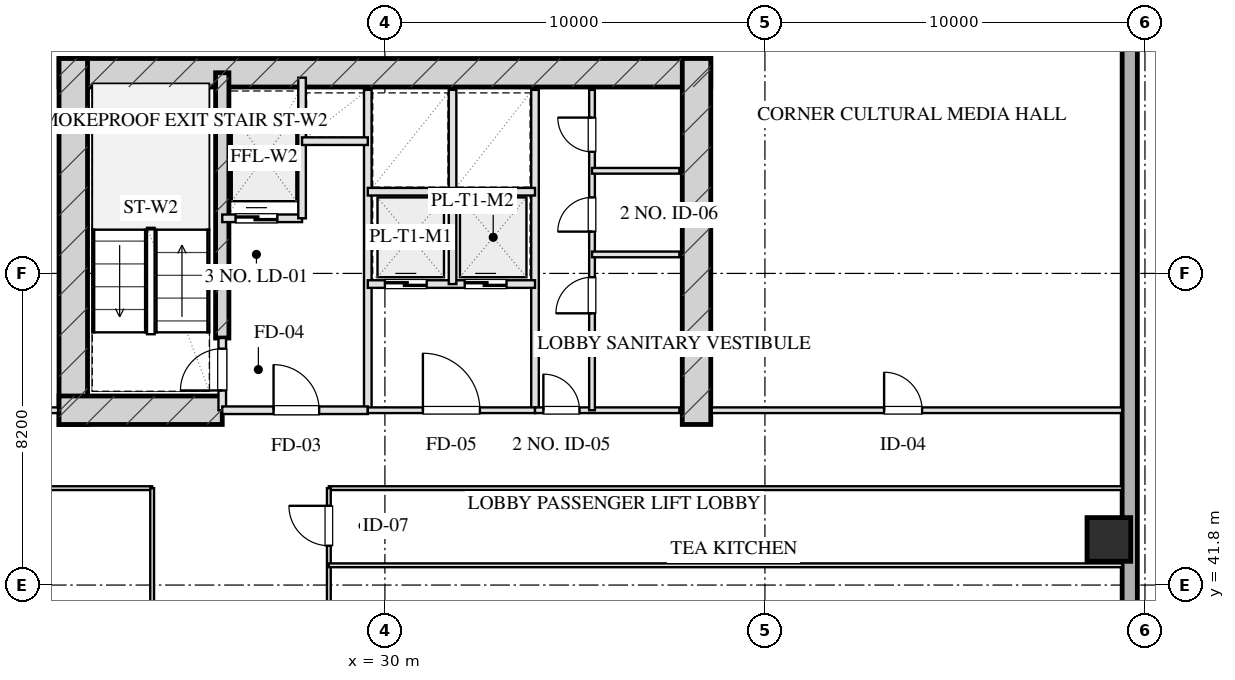
"""IFC4 building model, lengths in metres.
Left out: names, types, materials, properties, quantities, classifications, styles, units other than length and angle.
Written with IfcOpenShell. Run it as: python <this file> out.ifc"""

import sys

from ifc_helpers import new_model, si_unit, direction, frame, frame_2d, origin, origin_2d, place, context, subcontext, project, spatial, rectangle, hollow_rectangle, extrude, element, fill, save


model = new_model("IFC4")
c1 = context("Model", 3, precision=1e-05, world=origin(), true_north=direction((0.0, 1.0)))
c2 = subcontext(c1, "Body", "Model", "MODEL_VIEW")
j1 = project(units=[si_unit("LENGTHUNIT", "METRE"), si_unit("PLANEANGLEUNIT", "RADIAN")], contexts=[c1])
p1 = place(None, origin())
s1 = spatial("IfcSite", under=j1, at=p1, CompositionType="ELEMENT")
p2 = place(p1, origin())
s2 = spatial("IfcBuilding", under=s1, at=p2, CompositionType="ELEMENT")
p3 = place(p2, frame((0.0, 0.0, 74.75)))
s3 = spatial("IfcBuildingStorey", under=s2, at=p3, CompositionType="ELEMENT", Elevation=74.75)
p4 = place(p3, frame((21.425, 55.28, 0.0), z_axis=(0.0, 0.0, 1.0), x_axis=(1.0, 0.0, 0.0)))
e1 = element("IfcWall", 1, at=p4, inside=s3, PredefinedType="SHEAR", context=c2, shape_type="SweptSolid", body=[
    extrude(rectangle(XDim=17.15, YDim=0.75, at=frame_2d((8.575, 0.0))), origin(), (0.0, 0.0, 1.0), 3.45),
])
for number, where, z_axis, x_axis in (
    (2, (21.8, 46.025, 0.0), (0.0, 0.0, 1.0), (0.0, 1.0, 0.0)),
    (3, (38.2, 46.025, 0.0), (0.0, 0.0, 1.0), (0.0, 1.0, 0.0)),
):
    element("IfcWall", number, at=place(p3, frame(where, z_axis=z_axis, x_axis=x_axis)), inside=s3, PredefinedType="SHEAR", context=c2, shape_type="SweptSolid", body=[
        extrude(rectangle(XDim=9.63, YDim=0.75, at=frame_2d((4.815, 0.0))), origin(), (0.0, 0.0, 1.0), 3.45),
    ])
p5 = place(p3, frame((25.72, 48.3, 0.0), z_axis=(0.0, 0.0, 1.0), x_axis=(0.0, 1.0, 0.0)))
e4 = element("IfcWall", 4, at=p5, inside=s3, PredefinedType="SHEAR", context=c2, shape_type="SweptSolid", body=[
    extrude(rectangle(XDim=6.98, YDim=0.35, at=frame_2d((3.49, 0.0))), origin(), (0.0, 0.0, 1.0), 3.45),
])
p6 = place(p3, frame((21.425, 46.4, 0.0), z_axis=(0.0, 0.0, 1.0), x_axis=(1.0, 0.0, 0.0)))
e5 = element("IfcWall", 5, at=p6, inside=s3, PredefinedType="SHEAR", context=c2, shape_type="SweptSolid", body=[
    extrude(rectangle(XDim=4.295, YDim=0.75, at=frame_2d((2.147, 0.0))), origin(), (0.0, 0.0, 1.0), 3.45),
])
p7 = place(p3, frame((49.05, 43.0, 0.0), z_axis=(0.0, 0.0, 1.0), x_axis=(1.0, 0.0, 0.0)))
e6 = element("IfcColumn", 6, at=p7, inside=s3, PredefinedType="COLUMN", context=c2, shape_type="SweptSolid", body=[
    extrude(hollow_rectangle(XDim=1.15, YDim=1.15, WallThickness=0.04, at=origin_2d()), origin(), (0.0, 0.0, 1.0), 3.451),
])
p8 = place(p3, frame((49.6, 60.8, 0.0), z_axis=(0.0, 0.0, 1.0), x_axis=(0.0, -1.0, 0.0)))
e7 = element("IfcWall", 7, at=p8, inside=s3, PredefinedType="SOLIDWALL", context=c2, shape_type="SweptSolid", body=[
    extrude(rectangle(XDim=53.6, YDim=0.4, at=frame_2d((26.8, 0.0))), origin(), (0.0, 0.0, 1.0), 2.61),
])
p9 = place(p3, frame((25.72, 46.4, 0.0), z_axis=(0.0, 0.0, 1.0), x_axis=(0.0, 1.0, 0.0)))
e8 = element("IfcWall", 8, at=p9, inside=s3, PredefinedType="PARTITIONING", context=c2, shape_type="SweptSolid", body=[
    extrude(rectangle(XDim=1.9, YDim=0.2, at=frame_2d((0.95, 0.0))), origin(), (0.0, 0.0, 1.0), 3.175),
])
p10 = place(p9, frame((0.52, 0.0, 0.0)))
e9 = element("IfcOpeningElement", 9, at=p10, cuts=e8, PredefinedType="OPENING", context=c2, shape_type="SweptSolid", body=[
    extrude(rectangle(XDim=1.1, YDim=2.05, at=frame_2d((0.55, 1.025))), frame((0.0, 0.11, 0.0), z_axis=(0.0, -1.0, 0.0), x_axis=(1.0, 0.0, 0.0)), (0.0, 0.0, 1.0), 0.22),
])
p11 = place(p3, frame((29.55, 46.4, 0.0), z_axis=(0.0, 0.0, 1.0), x_axis=(0.0, 1.0, 0.0)))
e10 = element("IfcWall", 10, at=p11, inside=s3, PredefinedType="PARTITIONING", context=c2, shape_type="SweptSolid", body=[
    extrude(rectangle(XDim=8.43, YDim=0.2, at=frame_2d((4.215, 0.0))), origin(), (0.0, 0.0, 1.0), 3.175),
])
p12 = place(p3, frame((25.72, 46.4, 0.0), z_axis=(0.0, 0.0, 1.0), x_axis=(1.0, 0.0, 0.0)))
e11 = element("IfcWall", 11, at=p12, inside=s3, PredefinedType="PARTITIONING", context=c2, shape_type="SweptSolid", body=[
    extrude(rectangle(XDim=3.83, YDim=0.2, at=frame_2d((1.915, 0.0))), origin(), (0.0, 0.0, 1.0), 3.175),
])
p13 = place(p12, frame((1.35, 0.0, 0.0)))
e12 = element("IfcOpeningElement", 12, at=p13, cuts=e11, PredefinedType="OPENING", context=c2, shape_type="SweptSolid", body=[
    extrude(rectangle(XDim=1.2, YDim=2.05, at=frame_2d((0.6, 1.025))), frame((0.0, 0.11, 0.0), z_axis=(0.0, -1.0, 0.0), x_axis=(1.0, 0.0, 0.0)), (0.0, 0.0, 1.0), 0.22),
])
p14 = place(p3, frame((25.72, 51.45, 0.0), z_axis=(0.0, 0.0, 1.0), x_axis=(1.0, 0.0, 0.0)))
e13 = element("IfcWall", 13, at=p14, inside=s3, PredefinedType="PARTITIONING", context=c2, shape_type="SweptSolid", body=[
    extrude(rectangle(XDim=2.1, YDim=0.2, at=frame_2d((1.05, 0.0))), origin(), (0.0, 0.0, 1.0), 3.175),
])
p15 = place(p14, frame((0.35, 0.0, 0.0)))
e14 = element("IfcOpeningElement", 14, at=p15, cuts=e13, PredefinedType="OPENING", context=c2, shape_type="SweptSolid", body=[
    extrude(rectangle(XDim=1.1, YDim=2.05, at=frame_2d((0.55, 1.025))), frame((0.0, 0.11, 0.0), z_axis=(0.0, -1.0, 0.0), x_axis=(1.0, 0.0, 0.0)), (0.0, 0.0, 1.0), 0.22),
])
p16 = place(p3, frame((27.82, 51.45, 0.0), z_axis=(0.0, 0.0, 1.0), x_axis=(0.0, 1.0, 0.0)))
e15 = element("IfcWall", 15, at=p16, inside=s3, PredefinedType="PARTITIONING", context=c2, shape_type="SweptSolid", body=[
    extrude(rectangle(XDim=3.7, YDim=0.2, at=frame_2d((1.85, 0.0))), origin(), (0.0, 0.0, 1.0), 3.175),
])
p17 = place(p3, frame((27.82, 53.48, 0.0), z_axis=(0.0, 0.0, 1.0), x_axis=(1.0, 0.0, 0.0)))
e16 = element("IfcWall", 16, at=p17, inside=s3, PredefinedType="PARTITIONING", context=c2, shape_type="SweptSolid", body=[
    extrude(rectangle(XDim=1.73, YDim=0.2, at=frame_2d((0.865, 0.0))), origin(), (0.0, 0.0, 1.0), 3.175),
])
p18 = place(p3, frame((33.95, 46.4, 0.0), z_axis=(0.0, 0.0, 1.0), x_axis=(0.0, 1.0, 0.0)))
e17 = element("IfcWall", 17, at=p18, inside=s3, PredefinedType="PARTITIONING", context=c2, shape_type="SweptSolid", body=[
    extrude(rectangle(XDim=8.43, YDim=0.2, at=frame_2d((4.215, 0.0))), origin(), (0.0, 0.0, 1.0), 3.175),
])
p19 = place(p3, frame((29.55, 46.4, 0.0), z_axis=(0.0, 0.0, 1.0), x_axis=(1.0, 0.0, 0.0)))
e18 = element("IfcWall", 18, at=p19, inside=s3, PredefinedType="PARTITIONING", context=c2, shape_type="SweptSolid", body=[
    extrude(rectangle(XDim=4.4, YDim=0.15, at=frame_2d((2.2, 0.0))), origin(), (0.0, 0.0, 1.0), 3.175),
])
p20 = place(p19, frame((1.45, 0.0, 0.0)))
e19 = element("IfcOpeningElement", 19, at=p20, cuts=e18, PredefinedType="OPENING", context=c2, shape_type="SweptSolid", body=[
    extrude(rectangle(XDim=1.5, YDim=2.05, at=frame_2d((0.75, 1.025))), frame((0.0, 0.085, 0.0), z_axis=(0.0, -1.0, 0.0), x_axis=(1.0, 0.0, 0.0)), (0.0, 0.0, 1.0), 0.17),
])
p21 = place(p3, frame((29.55, 49.72, 0.0), z_axis=(0.0, 0.0, 1.0), x_axis=(1.0, 0.0, 0.0)))
e20 = element("IfcWall", 20, at=p21, inside=s3, PredefinedType="PARTITIONING", context=c2, shape_type="SweptSolid", body=[
    extrude(rectangle(XDim=4.4, YDim=0.2, at=frame_2d((2.2, 0.0))), origin(), (0.0, 0.0, 1.0), 3.175),
])
p22 = place(p21, frame((0.45, 0.0, 0.0)))
e21 = element("IfcOpeningElement", 21, at=p22, cuts=e20, PredefinedType="OPENING", context=c2, shape_type="SweptSolid", body=[
    extrude(rectangle(XDim=1.1, YDim=2.05, at=frame_2d((0.55, 1.025))), frame((0.0, 0.11, 0.0), z_axis=(0.0, -1.0, 0.0), x_axis=(1.0, 0.0, 0.0)), (0.0, 0.0, 1.0), 0.22),
])
p23 = place(p21, frame((2.55, 0.0, 0.0)))
e22 = element("IfcOpeningElement", 22, at=p23, cuts=e20, PredefinedType="OPENING", context=c2, shape_type="SweptSolid", body=[
    extrude(rectangle(XDim=1.1, YDim=2.05, at=frame_2d((0.55, 1.025))), frame((0.0, 0.11, 0.0), z_axis=(0.0, -1.0, 0.0), x_axis=(1.0, 0.0, 0.0)), (0.0, 0.0, 1.0), 0.22),
])
p24 = place(p3, frame((31.78, 49.72, 0.0), z_axis=(0.0, 0.0, 1.0), x_axis=(0.0, 1.0, 0.0)))
e23 = element("IfcWall", 23, at=p24, inside=s3, PredefinedType="PARTITIONING", context=c2, shape_type="SweptSolid", body=[
    extrude(rectangle(XDim=5.11, YDim=0.2, at=frame_2d((2.555, 0.0))), origin(), (0.0, 0.0, 1.0), 3.175),
])
p25 = place(p3, frame((29.55, 52.15, 0.0), z_axis=(0.0, 0.0, 1.0), x_axis=(1.0, 0.0, 0.0)))
e24 = element("IfcWall", 24, at=p25, inside=s3, PredefinedType="PARTITIONING", context=c2, shape_type="SweptSolid", body=[
    extrude(rectangle(XDim=4.4, YDim=0.2, at=frame_2d((2.2, 0.0))), origin(), (0.0, 0.0, 1.0), 3.175),
])
p26 = place(p3, frame((33.95, 46.4, 0.0), z_axis=(0.0, 0.0, 1.0), x_axis=(1.0, 0.0, 0.0)))
e25 = element("IfcWall", 25, at=p26, inside=s3, PredefinedType="PARTITIONING", context=c2, shape_type="SweptSolid", body=[
    extrude(rectangle(XDim=3.8, YDim=0.15, at=frame_2d((1.9, 0.0))), origin(), (0.0, 0.0, 1.0), 3.175),
])
p27 = place(p26, frame((0.22, 0.0, 0.0)))
e26 = element("IfcOpeningElement", 26, at=p27, cuts=e25, PredefinedType="OPENING", context=c2, shape_type="SweptSolid", body=[
    extrude(rectangle(XDim=0.95, YDim=2.05, at=frame_2d((0.475, 1.025))), frame((0.0, 0.085, 0.0), z_axis=(0.0, -1.0, 0.0), x_axis=(1.0, 0.0, 0.0)), (0.0, 0.0, 1.0), 0.17),
])
p28 = place(p3, frame((35.45, 46.4, 0.0), z_axis=(0.0, 0.0, 1.0), x_axis=(0.0, 1.0, 0.0)))
e27 = element("IfcWall", 27, at=p28, inside=s3, PredefinedType="PARTITIONING", context=c2, shape_type="SweptSolid", body=[
    extrude(rectangle(XDim=8.43, YDim=0.15, at=frame_2d((4.215, 0.0))), origin(), (0.0, 0.0, 1.0), 2.765),
])
p29 = place(p28, frame((2.55, 0.0, 0.0)))
e28 = element("IfcOpeningElement", 28, at=p29, cuts=e27, PredefinedType="OPENING", context=c2, shape_type="SweptSolid", body=[
    extrude(rectangle(XDim=0.95, YDim=2.05, at=frame_2d((0.475, 1.025))), frame((0.0, 0.085, 0.0), z_axis=(0.0, -1.0, 0.0), x_axis=(1.0, 0.0, 0.0)), (0.0, 0.0, 1.0), 0.17),
])
p30 = place(p28, frame((4.7, 0.0, 0.0)))
e29 = element("IfcOpeningElement", 29, at=p30, cuts=e27, PredefinedType="OPENING", context=c2, shape_type="SweptSolid", body=[
    extrude(rectangle(XDim=0.9, YDim=2.05, at=frame_2d((0.45, 1.025))), frame((0.0, 0.085, 0.0), z_axis=(0.0, -1.0, 0.0), x_axis=(1.0, 0.0, 0.0)), (0.0, 0.0, 1.0), 0.17),
])
p31 = place(p28, frame((6.8, 0.0, 0.0)))
e30 = element("IfcOpeningElement", 30, at=p31, cuts=e27, PredefinedType="OPENING", context=c2, shape_type="SweptSolid", body=[
    extrude(rectangle(XDim=0.9, YDim=2.05, at=frame_2d((0.45, 1.025))), frame((0.0, 0.085, 0.0), z_axis=(0.0, -1.0, 0.0), x_axis=(1.0, 0.0, 0.0)), (0.0, 0.0, 1.0), 0.17),
])
for number, where, z_axis, x_axis in (
    (31, (35.45, 50.5, 0.0), (0.0, 0.0, 1.0), (1.0, 0.0, 0.0)),
    (32, (35.45, 52.7, 0.0), (0.0, 0.0, 1.0), (1.0, 0.0, 0.0)),
):
    element("IfcWall", number, at=place(p3, frame(where, z_axis=z_axis, x_axis=x_axis)), inside=s3, PredefinedType="PARTITIONING", context=c2, shape_type="SweptSolid", body=[
        extrude(rectangle(XDim=2.3, YDim=0.15, at=frame_2d((1.15, 0.0))), origin(), (0.0, 0.0, 1.0), 3.175),
    ])
p32 = place(p3, frame((10.6, 46.4, 0.0), z_axis=(0.0, 0.0, 1.0), x_axis=(1.0, 0.0, 0.0)))
e33 = element("IfcWall", 33, at=p32, inside=s3, PredefinedType="PARTITIONING", context=c2, shape_type="SweptSolid", body=[
    extrude(rectangle(XDim=10.8, YDim=0.15, at=frame_2d((5.4, 0.0))), origin(), (0.0, 0.0, 1.0), 3.175),
])
p33 = place(p32, frame((4.536, 0.0, 0.0)))
e34 = element("IfcOpeningElement", 34, at=p33, cuts=e33, PredefinedType="OPENING", context=c2, shape_type="SweptSolid", body=[
    extrude(rectangle(XDim=1.0, YDim=2.05, at=frame_2d((0.5, 1.025))), frame((0.0, 0.085, 0.0), z_axis=(0.0, -1.0, 0.0), x_axis=(1.0, 0.0, 0.0)), (0.0, 0.0, 1.0), 0.17),
])
p34 = place(p3, frame((38.6, 46.4, 0.0), z_axis=(0.0, 0.0, 1.0), x_axis=(1.0, 0.0, 0.0)))
e35 = element("IfcWall", 35, at=p34, inside=s3, PredefinedType="PARTITIONING", context=c2, shape_type="SweptSolid", body=[
    extrude(rectangle(XDim=10.8, YDim=0.15, at=frame_2d((5.4, 0.0))), origin(), (0.0, 0.0, 1.0), 3.175),
])
p35 = place(p34, frame((4.536, 0.0, 0.0)))
e36 = element("IfcOpeningElement", 36, at=p35, cuts=e35, PredefinedType="OPENING", context=c2, shape_type="SweptSolid", body=[
    extrude(rectangle(XDim=1.0, YDim=2.05, at=frame_2d((0.5, 1.025))), frame((0.0, 0.085, 0.0), z_axis=(0.0, -1.0, 0.0), x_axis=(1.0, 0.0, 0.0)), (0.0, 0.0, 1.0), 0.17),
])
p36 = place(p3, frame((10.6, 44.35, 0.0), z_axis=(0.0, 0.0, 1.0), x_axis=(1.0, 0.0, 0.0)))
e37 = element("IfcWall", 37, at=p36, inside=s3, PredefinedType="MOVABLE", context=c2, shape_type="SweptSolid", body=[
    extrude(rectangle(XDim=13.275, YDim=0.1, at=frame_2d((6.637, 0.0))), origin(), (0.0, 0.0, 1.0), 3.175),
])
p37 = place(p3, frame((28.525, 44.35, 0.0), z_axis=(0.0, 0.0, 1.0), x_axis=(1.0, 0.0, 0.0)))
e38 = element("IfcWall", 38, at=p37, inside=s3, PredefinedType="MOVABLE", context=c2, shape_type="SweptSolid", body=[
    extrude(rectangle(XDim=20.875, YDim=0.1, at=frame_2d((10.438, 0.0))), origin(), (0.0, 0.0, 1.0), 3.175),
])
p38 = place(p3, frame((23.875, 23.65, 0.0), z_axis=(0.0, 0.0, 1.0), x_axis=(0.0, 1.0, 0.0)))
e39 = element("IfcWall", 39, at=p38, inside=s3, PredefinedType="MOVABLE", context=c2, shape_type="SweptSolid", body=[
    extrude(rectangle(XDim=20.7, YDim=0.1, at=frame_2d((10.35, 0.0))), origin(), (0.0, 0.0, 1.0), 3.175),
])
p39 = place(p38, frame((4.075, 0.0, 0.0)))
e40 = element("IfcOpeningElement", 40, at=p39, cuts=e39, PredefinedType="OPENING", context=c2, shape_type="SweptSolid", body=[
    extrude(rectangle(XDim=1.05, YDim=2.05, at=frame_2d((0.525, 1.025))), frame((0.0, 0.06, 0.0), z_axis=(0.0, -1.0, 0.0), x_axis=(1.0, 0.0, 0.0)), (0.0, 0.0, 1.0), 0.12),
])
p40 = place(p38, frame((14.425, 0.0, 0.0)))
e41 = element("IfcOpeningElement", 41, at=p40, cuts=e39, PredefinedType="OPENING", context=c2, shape_type="SweptSolid", body=[
    extrude(rectangle(XDim=1.0, YDim=2.05, at=frame_2d((0.5, 1.025))), frame((0.0, 0.06, 0.0), z_axis=(0.0, -1.0, 0.0), x_axis=(1.0, 0.0, 0.0)), (0.0, 0.0, 1.0), 0.12),
])
p41 = place(p3, frame((28.525, 23.65, 0.0), z_axis=(0.0, 0.0, 1.0), x_axis=(0.0, 1.0, 0.0)))
e42 = element("IfcWall", 42, at=p41, inside=s3, PredefinedType="MOVABLE", context=c2, shape_type="SweptSolid", body=[
    extrude(rectangle(XDim=20.7, YDim=0.1, at=frame_2d((10.35, 0.0))), origin(), (0.0, 0.0, 1.0), 3.175),
])
p42 = place(p41, frame((0.775, 0.0, 0.0)))
e43 = element("IfcOpeningElement", 43, at=p42, cuts=e42, PredefinedType="OPENING", context=c2, shape_type="SweptSolid", body=[
    extrude(rectangle(XDim=1.0, YDim=2.05, at=frame_2d((0.5, 1.025))), frame((0.0, 0.06, 0.0), z_axis=(0.0, -1.0, 0.0), x_axis=(1.0, 0.0, 0.0)), (0.0, 0.0, 1.0), 0.12),
])
p43 = place(p41, frame((3.95, 0.0, 0.0)))
e44 = element("IfcOpeningElement", 44, at=p43, cuts=e42, PredefinedType="OPENING", context=c2, shape_type="SweptSolid", body=[
    extrude(rectangle(XDim=1.0, YDim=2.05, at=frame_2d((0.5, 1.025))), frame((0.0, 0.06, 0.0), z_axis=(0.0, -1.0, 0.0), x_axis=(1.0, 0.0, 0.0)), (0.0, 0.0, 1.0), 0.12),
])
p44 = place(p41, frame((7.51, 0.0, 0.0)))
e45 = element("IfcOpeningElement", 45, at=p44, cuts=e42, PredefinedType="OPENING", context=c2, shape_type="SweptSolid", body=[
    extrude(rectangle(XDim=1.0, YDim=2.05, at=frame_2d((0.5, 1.025))), frame((0.0, 0.06, 0.0), z_axis=(0.0, -1.0, 0.0), x_axis=(1.0, 0.0, 0.0)), (0.0, 0.0, 1.0), 0.12),
])
p45 = place(p41, frame((11.51, 0.0, 0.0)))
e46 = element("IfcOpeningElement", 46, at=p45, cuts=e42, PredefinedType="OPENING", context=c2, shape_type="SweptSolid", body=[
    extrude(rectangle(XDim=0.85, YDim=2.05, at=frame_2d((0.425, 1.025))), frame((0.0, 0.06, 0.0), z_axis=(0.0, -1.0, 0.0), x_axis=(1.0, 0.0, 0.0)), (0.0, 0.0, 1.0), 0.12),
])
p46 = place(p41, frame((15.75, 0.0, 0.0)))
e47 = element("IfcOpeningElement", 47, at=p46, cuts=e42, PredefinedType="OPENING", context=c2, shape_type="SweptSolid", body=[
    extrude(rectangle(XDim=1.0, YDim=2.05, at=frame_2d((0.5, 1.025))), frame((0.0, 0.06, 0.0), z_axis=(0.0, -1.0, 0.0), x_axis=(1.0, 0.0, 0.0)), (0.0, 0.0, 1.0), 0.12),
])
p47 = place(p41, frame((19.185, 0.0, 0.0)))
e48 = element("IfcOpeningElement", 48, at=p47, cuts=e42, PredefinedType="OPENING", context=c2, shape_type="SweptSolid", body=[
    extrude(rectangle(XDim=1.05, YDim=2.05, at=frame_2d((0.525, 1.025))), frame((0.0, 0.06, 0.0), z_axis=(0.0, -1.0, 0.0), x_axis=(1.0, 0.0, 0.0)), (0.0, 0.0, 1.0), 0.12),
])
p48 = place(p3, frame((28.525, 42.32, 0.0), z_axis=(0.0, 0.0, 1.0), x_axis=(1.0, 0.0, 0.0)))
e49 = element("IfcWall", 49, at=p48, inside=s3, PredefinedType="MOVABLE", context=c2, shape_type="SweptSolid", body=[
    extrude(rectangle(XDim=20.875, YDim=0.1, at=frame_2d((10.438, 0.0))), origin(), (0.0, 0.0, 1.0), 3.175),
])
p49 = place(p10, origin())
e50 = element("IfcDoor", 50, at=p49, inside=s3, OperationType="SINGLE_SWING_LEFT", PredefinedType="DOOR", context=c2, shape_type="SweptSolid", body=[
    extrude(rectangle(XDim=1.1, YDim=2.05, at=frame_2d((0.55, 1.025))), frame((0.0, 0.025, 0.0), z_axis=(0.0, -1.0, 0.0), x_axis=(1.0, 0.0, 0.0)), (0.0, 0.0, 1.0), 0.05),
])
fill(e9, e50)
p50 = place(p13, origin())
e51 = element("IfcDoor", 51, at=p50, inside=s3, OperationType="SINGLE_SWING_LEFT", PredefinedType="DOOR", context=c2, shape_type="SweptSolid", body=[
    extrude(rectangle(XDim=1.2, YDim=2.05, at=frame_2d((0.6, 1.025))), frame((0.0, 0.025, 0.0), z_axis=(0.0, -1.0, 0.0), x_axis=(1.0, 0.0, 0.0)), (0.0, 0.0, 1.0), 0.05),
])
fill(e12, e51)
p51 = place(p15, origin())
e52 = element("IfcDoor", 52, at=p51, inside=s3, OperationType="DOUBLE_DOOR_SLIDING", PredefinedType="DOOR", context=c2, shape_type="SweptSolid", body=[
    extrude(rectangle(XDim=1.1, YDim=2.05, at=frame_2d((0.55, 1.025))), frame((0.0, 0.025, 0.0), z_axis=(0.0, -1.0, 0.0), x_axis=(1.0, 0.0, 0.0)), (0.0, 0.0, 1.0), 0.05),
])
fill(e14, e52)
p52 = place(p20, origin())
e53 = element("IfcDoor", 53, at=p52, inside=s3, OperationType="SINGLE_SWING_LEFT", PredefinedType="DOOR", context=c2, shape_type="SweptSolid", body=[
    extrude(rectangle(XDim=1.5, YDim=2.05, at=frame_2d((0.75, 1.025))), frame((0.0, 0.025, 0.0), z_axis=(0.0, -1.0, 0.0), x_axis=(1.0, 0.0, 0.0)), (0.0, 0.0, 1.0), 0.05),
])
fill(e19, e53)
p53 = place(p22, origin())
e54 = element("IfcDoor", 54, at=p53, inside=s3, OperationType="DOUBLE_DOOR_SLIDING", PredefinedType="DOOR", context=c2, shape_type="SweptSolid", body=[
    extrude(rectangle(XDim=1.1, YDim=2.05, at=frame_2d((0.55, 1.025))), frame((0.0, 0.025, 0.0), z_axis=(0.0, -1.0, 0.0), x_axis=(1.0, 0.0, 0.0)), (0.0, 0.0, 1.0), 0.05),
])
fill(e21, e54)
p54 = place(p23, origin())
e55 = element("IfcDoor", 55, at=p54, inside=s3, OperationType="DOUBLE_DOOR_SLIDING", PredefinedType="DOOR", context=c2, shape_type="SweptSolid", body=[
    extrude(rectangle(XDim=1.1, YDim=2.05, at=frame_2d((0.55, 1.025))), frame((0.0, 0.025, 0.0), z_axis=(0.0, -1.0, 0.0), x_axis=(1.0, 0.0, 0.0)), (0.0, 0.0, 1.0), 0.05),
])
fill(e22, e55)
p55 = place(p27, origin())
e56 = element("IfcDoor", 56, at=p55, inside=s3, OperationType="SINGLE_SWING_LEFT", PredefinedType="DOOR", context=c2, shape_type="SweptSolid", body=[
    extrude(rectangle(XDim=0.95, YDim=2.05, at=frame_2d((0.475, 1.025))), frame((0.0, 0.025, 0.0), z_axis=(0.0, -1.0, 0.0), x_axis=(1.0, 0.0, 0.0)), (0.0, 0.0, 1.0), 0.05),
])
fill(e26, e56)
p56 = place(p29, origin())
e57 = element("IfcDoor", 57, at=p56, inside=s3, OperationType="SINGLE_SWING_LEFT", PredefinedType="DOOR", context=c2, shape_type="SweptSolid", body=[
    extrude(rectangle(XDim=0.95, YDim=2.05, at=frame_2d((0.475, 1.025))), frame((0.0, 0.025, 0.0), z_axis=(0.0, -1.0, 0.0), x_axis=(1.0, 0.0, 0.0)), (0.0, 0.0, 1.0), 0.05),
])
fill(e28, e57)
p57 = place(p30, origin())
e58 = element("IfcDoor", 58, at=p57, inside=s3, OperationType="SINGLE_SWING_LEFT", PredefinedType="DOOR", context=c2, shape_type="SweptSolid", body=[
    extrude(rectangle(XDim=0.9, YDim=2.05, at=frame_2d((0.45, 1.025))), frame((0.0, 0.025, 0.0), z_axis=(0.0, -1.0, 0.0), x_axis=(1.0, 0.0, 0.0)), (0.0, 0.0, 1.0), 0.05),
])
fill(e29, e58)
p58 = place(p31, origin())
e59 = element("IfcDoor", 59, at=p58, inside=s3, OperationType="SINGLE_SWING_RIGHT", PredefinedType="DOOR", context=c2, shape_type="SweptSolid", body=[
    extrude(rectangle(XDim=0.9, YDim=2.05, at=frame_2d((0.45, 1.025))), frame((0.0, 0.025, 0.0), z_axis=(0.0, -1.0, 0.0), x_axis=(1.0, 0.0, 0.0)), (0.0, 0.0, 1.0), 0.05),
])
fill(e30, e59)
p59 = place(p35, origin())
e60 = element("IfcDoor", 60, at=p59, inside=s3, OperationType="SINGLE_SWING_LEFT", PredefinedType="DOOR", context=c2, shape_type="SweptSolid", body=[
    extrude(rectangle(XDim=1.0, YDim=2.05, at=frame_2d((0.5, 1.025))), frame((0.0, 0.025, 0.0), z_axis=(0.0, -1.0, 0.0), x_axis=(1.0, 0.0, 0.0)), (0.0, 0.0, 1.0), 0.05),
])
fill(e36, e60)
p60 = place(p47, origin())
e61 = element("IfcDoor", 61, at=p60, inside=s3, OperationType="SINGLE_SWING_RIGHT", PredefinedType="DOOR", context=c2, shape_type="SweptSolid", body=[
    extrude(rectangle(XDim=1.05, YDim=2.05, at=frame_2d((0.525, 1.025))), frame((0.0, 0.025, 0.0), z_axis=(0.0, -1.0, 0.0), x_axis=(1.0, 0.0, 0.0)), (0.0, 0.0, 1.0), 0.05),
])
fill(e48, e61)
save(model, sys.argv[1])
